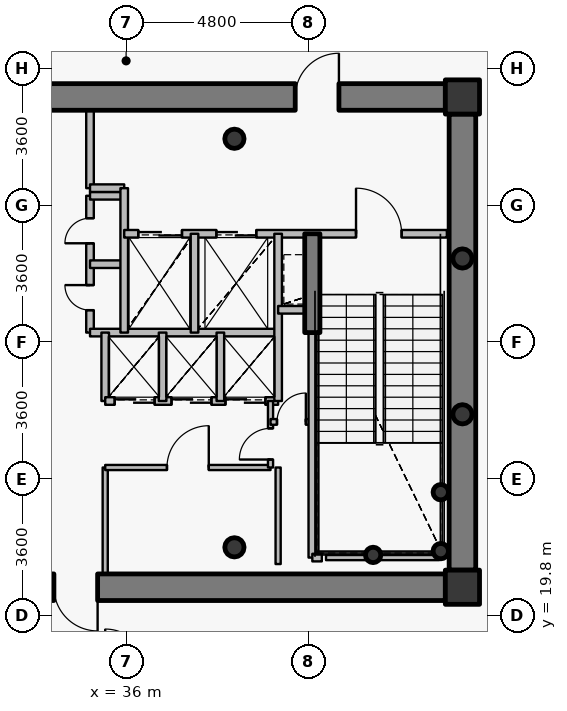
"""IFC4 building model, lengths in metres.
Left out: names, types, materials, properties, quantities, classifications, styles, units other than length and angle.
Written with IfcOpenShell. Run it as: python <this file> out.ifc"""

import sys

from ifc_helpers import new_model, si_unit, direction, frame, frame_2d, origin, origin_2d, place, context, subcontext, project, spatial, rectangle, hollow_circle, extrude, source, transform, mapped, element, fill, save


model = new_model("IFC4")
c1 = context("Model", 3, precision=1e-05, world=origin(), true_north=direction((0.0, 1.0)))
c2 = subcontext(c1, "Body", "Model", "MODEL_VIEW")
j1 = project(units=[si_unit("LENGTHUNIT", "METRE"), si_unit("PLANEANGLEUNIT", "RADIAN")], contexts=[c1])
p1 = place(None, origin())
s1 = spatial("IfcSite", under=j1, at=p1, CompositionType="ELEMENT")
p2 = place(p1, origin())
s2 = spatial("IfcBuilding", under=s1, at=p2, CompositionType="ELEMENT")
p3 = place(p2, frame((0.0, 0.0, 351.0)))
s3 = spatial("IfcBuildingStorey", under=s2, at=p3, CompositionType="ELEMENT", Elevation=351.0)
for number, where, z_axis, x_axis in (
    (1, (44.85, 20.55, 0.0), (0.0, 0.0, 1.0), (1.0, 0.0, 0.0)),
    (2, (44.85, 33.45, 0.0), (0.0, 0.0, 1.0), (1.0, 0.0, 0.0)),
):
    element("IfcColumn", number, at=place(p3, frame(where, z_axis=z_axis, x_axis=x_axis)), inside=s3, PredefinedType="COLUMN", context=c2, shape_type="SweptSolid", body=[
        extrude(rectangle(XDim=0.9, YDim=0.9, at=origin_2d()), origin(), (0.0, 0.0, 1.0), 4.2),
    ])
for number, where, z_axis, x_axis in (
    (3, (38.85, 21.6, 0.0), (0.0, 0.0, 1.0), (1.0, 0.0, 0.0)),
    (4, (38.85, 32.35, 0.0), (0.0, 0.0, 1.0), (1.0, 0.0, 0.0)),
):
    element("IfcColumn", number, at=place(p3, frame(where, z_axis=z_axis, x_axis=x_axis)), inside=s3, PredefinedType="COLUMN", context=c2, shape_type="SweptSolid", body=[
        extrude(hollow_circle(Radius=0.254, WallThickness=0.02, at=origin_2d()), origin(), (0.0, 0.0, 1.0), 4.2),
    ])
for number, where, z_axis, x_axis in (
    (5, (44.28, 21.5, 0.0), (0.0, 0.0, 1.0), (1.0, 0.0, 0.0)),
    (6, (44.28, 23.05, 0.0), (0.0, 0.0, 1.0), (1.0, 0.0, 0.0)),
    (7, (42.5, 21.4, 0.0), (0.0, 0.0, 1.0), (1.0, 0.0, 0.0)),
):
    element("IfcColumn", number, at=place(p3, frame(where, z_axis=z_axis, x_axis=x_axis)), inside=s3, PredefinedType="COLUMN", context=c2, shape_type="SweptSolid", body=[
        extrude(hollow_circle(Radius=0.203, WallThickness=0.016, at=origin_2d()), origin(), (0.0, 0.0, 1.0), 4.2),
    ])
p4 = place(p3, frame((27.6, 33.45, 0.0), z_axis=(0.0, 0.0, 1.0), x_axis=(1.0, 0.0, 0.0)))
e8 = element("IfcWall", 8, at=p4, inside=s3, PredefinedType="SHEAR", context=c2, shape_type="SweptSolid", body=[
    extrude(rectangle(XDim=16.8, YDim=0.7, at=frame_2d((8.4, 0.0))), origin(), (0.0, 0.0, 1.0), 3.5),
])
p5 = place(p4, frame((12.85, 0.0, 0.0)))
e9 = element("IfcOpeningElement", 9, at=p5, cuts=e8, PredefinedType="OPENING", context=c2, shape_type="SweptSolid", body=[
    extrude(rectangle(XDim=1.15, YDim=2.15, at=origin_2d()), frame((0.575, 0.36, 1.075), z_axis=(0.0, -1.0, 0.0), x_axis=(1.0, 0.0, 0.0)), (0.0, 0.0, 1.0), 0.72),
])
p6 = place(p3, frame((44.85, 33.0, 0.0), z_axis=(0.0, 0.0, 1.0), x_axis=(0.0, -1.0, 0.0)))
e10 = element("IfcWall", 10, at=p6, inside=s3, PredefinedType="SHEAR", context=c2, shape_type="SweptSolid", body=[
    extrude(rectangle(XDim=12.0, YDim=0.7, at=frame_2d((6.0, 0.0))), origin(), (0.0, 0.0, 1.0), 3.5),
])
p7 = place(p3, frame((44.4, 20.55, 0.0), z_axis=(0.0, 0.0, 1.0), x_axis=(-1.0, 0.0, 0.0)))
e11 = element("IfcWall", 11, at=p7, inside=s3, PredefinedType="SHEAR", context=c2, shape_type="SweptSolid", body=[
    extrude(rectangle(XDim=16.8, YDim=0.7, at=frame_2d((8.4, 0.0))), origin(), (0.0, 0.0, 1.0), 3.5),
])
p8 = place(p7, frame((13.0, 0.0, 0.0)))
e12 = element("IfcOpeningElement", 12, at=p8, cuts=e11, PredefinedType="OPENING", context=c2, shape_type="SweptSolid", body=[
    extrude(rectangle(XDim=1.15, YDim=2.15, at=origin_2d()), frame((0.575, 0.36, 1.075), z_axis=(0.0, -1.0, 0.0), x_axis=(1.0, 0.0, 0.0)), (0.0, 0.0, 1.0), 0.72),
])
p9 = place(p7, frame((9.15, 0.0, 0.0)))
e13 = element("IfcOpeningElement", 13, at=p9, cuts=e11, PredefinedType="OPENING", context=c2, shape_type="SweptSolid", body=[
    extrude(rectangle(XDim=1.15, YDim=2.15, at=origin_2d()), frame((0.575, 0.36, 1.075), z_axis=(0.0, -1.0, 0.0), x_axis=(1.0, 0.0, 0.0)), (0.0, 0.0, 1.0), 0.72),
])
p10 = place(p3, frame((40.9, 27.25, 0.0), z_axis=(0.0, 0.0, 1.0), x_axis=(0.0, 1.0, 0.0)))
e14 = element("IfcWall", 14, at=p10, inside=s3, PredefinedType="SHEAR", context=c2, shape_type="SweptSolid", body=[
    extrude(rectangle(XDim=2.6, YDim=0.4, at=frame_2d((1.3, 0.0))), origin(), (0.0, 0.0, 1.0), 3.55),
])
for number, where, z_axis, x_axis in (
    (15, (44.85, 25.1, 0.0), (0.0, 0.0, 1.0), (1.0, 0.0, 0.0)),
    (16, (44.85, 29.2, 0.0), (0.0, 0.0, 1.0), (1.0, 0.0, 0.0)),
):
    element("IfcColumn", number, at=place(p3, frame(where, z_axis=z_axis, x_axis=x_axis)), inside=s3, PredefinedType="COLUMN", context=c2, shape_type="SweptSolid", body=[
        extrude(hollow_circle(Radius=0.254, WallThickness=0.02, at=origin_2d()), origin(), (0.0, 0.0, 1.0), 4.2),
    ])
p11 = place(p3, frame((35.05, 27.25, 0.0), z_axis=(0.0, 0.0, 1.0), x_axis=(0.0, 1.0, 0.0)))
e17 = element("IfcWall", 17, at=p11, inside=s3, PredefinedType="PARTITIONING", context=c2, shape_type="SweptSolid", body=[
    extrude(rectangle(XDim=3.6, YDim=0.2, at=frame_2d((1.8, 0.0))), origin(), (0.0, 0.0, 1.0), 3.95),
])
p12 = place(p11, frame((0.59, 0.0, 0.0)))
e18 = element("IfcOpeningElement", 18, at=p12, cuts=e17, PredefinedType="OPENING", context=c2, shape_type="SweptSolid", body=[
    extrude(rectangle(XDim=0.66, YDim=2.05, at=origin_2d()), frame((0.33, 0.11, 1.025), z_axis=(0.0, -1.0, 0.0), x_axis=(1.0, 0.0, 0.0)), (0.0, 0.0, 1.0), 0.22),
])
p13 = place(p11, frame((2.35, 0.0, 0.0)))
e19 = element("IfcOpeningElement", 19, at=p13, cuts=e17, PredefinedType="OPENING", context=c2, shape_type="SweptSolid", body=[
    extrude(rectangle(XDim=0.66, YDim=2.05, at=origin_2d()), frame((0.33, 0.11, 1.025), z_axis=(0.0, -1.0, 0.0), x_axis=(1.0, 0.0, 0.0)), (0.0, 0.0, 1.0), 0.22),
])
p14 = place(p3, frame((35.05, 27.25, 0.0), z_axis=(0.0, 0.0, 1.0), x_axis=(1.0, 0.0, 0.0)))
e20 = element("IfcWall", 20, at=p14, inside=s3, PredefinedType="PARTITIONING", context=c2, shape_type="SweptSolid", body=[
    extrude(rectangle(XDim=4.95, YDim=0.2, at=frame_2d((2.475, 0.0))), origin(), (0.0, 0.0, 1.0), 3.535),
])
for number, where, z_axis, x_axis in (
    (21, (35.05, 29.05, 0.0), (0.0, 0.0, 1.0), (1.0, 0.0, 0.0)),
    (22, (35.05, 30.85, 0.0), (0.0, 0.0, 1.0), (1.0, 0.0, 0.0)),
):
    element("IfcWall", number, at=place(p3, frame(where, z_axis=z_axis, x_axis=x_axis)), inside=s3, PredefinedType="PARTITIONING", context=c2, shape_type="SweptSolid", body=[
        extrude(rectangle(XDim=0.9, YDim=0.2, at=frame_2d((0.45, 0.0))), origin(), (0.0, 0.0, 1.0), 3.95),
    ])
p15 = place(p3, frame((35.05, 31.05, 0.0), z_axis=(0.0, 0.0, 1.0), x_axis=(0.0, 1.0, 0.0)))
e23 = element("IfcWall", 23, at=p15, inside=s3, PredefinedType="PARTITIONING", context=c2, shape_type="SweptSolid", body=[
    extrude(rectangle(XDim=2.05, YDim=0.2, at=frame_2d((1.025, 0.0))), origin(), (0.0, 0.0, 1.0), 3.535),
])
p16 = place(p3, frame((35.05, 31.05, 0.0), z_axis=(0.0, 0.0, 1.0), x_axis=(1.0, 0.0, 0.0)))
e24 = element("IfcWall", 24, at=p16, inside=s3, PredefinedType="PARTITIONING", context=c2, shape_type="SweptSolid", body=[
    extrude(rectangle(XDim=0.9, YDim=0.2, at=frame_2d((0.45, 0.0))), origin(), (0.0, 0.0, 1.0), 3.95),
])
p17 = place(p3, frame((35.45, 20.9, 0.0), z_axis=(0.0, 0.0, 1.0), x_axis=(0.0, 1.0, 0.0)))
e25 = element("IfcWall", 25, at=p17, inside=s3, PredefinedType="PARTITIONING", context=c2, shape_type="SweptSolid", body=[
    extrude(rectangle(XDim=2.8, YDim=0.135, at=frame_2d((1.4, 0.0))), origin(), (0.0, 0.0, 1.0), 3.535),
])
p18 = place(p3, frame((35.45, 23.7, 0.0), z_axis=(0.0, 0.0, 1.0), x_axis=(1.0, 0.0, 0.0)))
e26 = element("IfcWall", 26, at=p18, inside=s3, PredefinedType="PARTITIONING", context=c2, shape_type="SweptSolid", body=[
    extrude(rectangle(XDim=4.35, YDim=0.135, at=frame_2d((2.175, 0.0))), origin(), (0.0, 0.0, 1.0), 3.535),
])
p19 = place(p18, frame((1.625, 0.0, 0.0)))
e27 = element("IfcOpeningElement", 27, at=p19, cuts=e26, PredefinedType="OPENING", context=c2, shape_type="SweptSolid", body=[
    extrude(rectangle(XDim=1.1, YDim=2.15, at=origin_2d()), frame((0.55, 0.078, 1.075), z_axis=(0.0, -1.0, 0.0), x_axis=(1.0, 0.0, 0.0)), (0.0, 0.0, 1.0), 0.155),
])
p20 = place(p3, frame((35.45, 25.45, 0.0), z_axis=(0.0, 0.0, 1.0), x_axis=(0.0, 1.0, 0.0)))
e28 = element("IfcWall", 28, at=p20, inside=s3, PredefinedType="PARTITIONING", context=c2, shape_type="SweptSolid", body=[
    extrude(rectangle(XDim=1.8, YDim=0.2, at=frame_2d((0.9, 0.0))), origin(), (0.0, 0.0, 1.0), 3.95),
])
p21 = place(p3, frame((35.45, 25.45, 0.0), z_axis=(0.0, 0.0, 1.0), x_axis=(1.0, 0.0, 0.0)))
e29 = element("IfcWall", 29, at=p21, inside=s3, PredefinedType="PARTITIONING", context=c2, shape_type="SweptSolid", body=[
    extrude(rectangle(XDim=4.55, YDim=0.2, at=frame_2d((2.275, 0.0))), origin(), (0.0, 0.0, 1.0), 3.535),
])
p22 = place(p21, frame((0.25, 0.0, 0.0)))
e30 = element("IfcOpeningElement", 30, at=p22, cuts=e29, PredefinedType="OPENING", context=c2, shape_type="SweptSolid", body=[
    extrude(rectangle(XDim=1.05, YDim=2.15, at=origin_2d()), frame((0.525, 0.11, 1.075), z_axis=(0.0, -1.0, 0.0), x_axis=(1.0, 0.0, 0.0)), (0.0, 0.0, 1.0), 0.22),
])
p23 = place(p21, frame((1.745, 0.0, 0.0)))
e31 = element("IfcOpeningElement", 31, at=p23, cuts=e29, PredefinedType="OPENING", context=c2, shape_type="SweptSolid", body=[
    extrude(rectangle(XDim=1.05, YDim=2.15, at=origin_2d()), frame((0.525, 0.11, 1.075), z_axis=(0.0, -1.0, 0.0), x_axis=(1.0, 0.0, 0.0)), (0.0, 0.0, 1.0), 0.22),
])
p24 = place(p21, frame((3.165, 0.0, 0.0)))
e32 = element("IfcOpeningElement", 32, at=p24, cuts=e29, PredefinedType="OPENING", context=c2, shape_type="SweptSolid", body=[
    extrude(rectangle(XDim=1.05, YDim=2.15, at=origin_2d()), frame((0.525, 0.11, 1.075), z_axis=(0.0, -1.0, 0.0), x_axis=(1.0, 0.0, 0.0)), (0.0, 0.0, 1.0), 0.22),
])
p25 = place(p3, frame((35.95, 27.25, 0.0), z_axis=(0.0, 0.0, 1.0), x_axis=(0.0, 1.0, 0.0)))
e33 = element("IfcWall", 33, at=p25, inside=s3, PredefinedType="PARTITIONING", context=c2, shape_type="SweptSolid", body=[
    extrude(rectangle(XDim=3.8, YDim=0.2, at=frame_2d((1.9, 0.0))), origin(), (0.0, 0.0, 1.0), 3.95),
])
p26 = place(p3, frame((35.95, 29.85, 0.0), z_axis=(0.0, 0.0, 1.0), x_axis=(1.0, 0.0, 0.0)))
e34 = element("IfcWall", 34, at=p26, inside=s3, PredefinedType="PARTITIONING", context=c2, shape_type="SweptSolid", body=[
    extrude(rectangle(XDim=8.49, YDim=0.2, at=frame_2d((4.245, 0.0))), origin(), (0.0, 0.0, 1.0), 3.535),
])
p27 = place(p26, frame((6.1, 0.0, 0.0)))
e35 = element("IfcOpeningElement", 35, at=p27, cuts=e34, PredefinedType="OPENING", context=c2, shape_type="SweptSolid", body=[
    extrude(rectangle(XDim=1.2, YDim=2.15, at=origin_2d()), frame((0.6, 0.11, 1.075), z_axis=(0.0, -1.0, 0.0), x_axis=(1.0, 0.0, 0.0)), (0.0, 0.0, 1.0), 0.22),
])
p28 = place(p26, frame((0.37, 0.0, 0.0)))
e36 = element("IfcOpeningElement", 36, at=p28, cuts=e34, PredefinedType="OPENING", context=c2, shape_type="SweptSolid", body=[
    extrude(rectangle(XDim=1.15, YDim=2.15, at=origin_2d()), frame((0.575, 0.11, 1.075), z_axis=(0.0, -1.0, 0.0), x_axis=(1.0, 0.0, 0.0)), (0.0, 0.0, 1.0), 0.22),
])
p29 = place(p26, frame((2.425, 0.0, 0.0)))
e37 = element("IfcOpeningElement", 37, at=p29, cuts=e34, PredefinedType="OPENING", context=c2, shape_type="SweptSolid", body=[
    extrude(rectangle(XDim=1.05, YDim=2.15, at=origin_2d()), frame((0.525, 0.11, 1.075), z_axis=(0.0, -1.0, 0.0), x_axis=(1.0, 0.0, 0.0)), (0.0, 0.0, 1.0), 0.22),
])
p30 = place(p3, frame((36.96, 25.45, 0.0), z_axis=(0.0, 0.0, 1.0), x_axis=(0.0, 1.0, 0.0)))
e38 = element("IfcWall", 38, at=p30, inside=s3, PredefinedType="PARTITIONING", context=c2, shape_type="SweptSolid", body=[
    extrude(rectangle(XDim=1.8, YDim=0.2, at=frame_2d((0.9, 0.0))), origin(), (0.0, 0.0, 1.0), 3.95),
])
p31 = place(p3, frame((37.8, 27.25, 0.0), z_axis=(0.0, 0.0, 1.0), x_axis=(0.0, 1.0, 0.0)))
e39 = element("IfcWall", 39, at=p31, inside=s3, PredefinedType="PARTITIONING", context=c2, shape_type="SweptSolid", body=[
    extrude(rectangle(XDim=2.6, YDim=0.2, at=frame_2d((1.3, 0.0))), origin(), (0.0, 0.0, 1.0), 3.95),
])
p32 = place(p3, frame((38.48, 25.45, 0.0), z_axis=(0.0, 0.0, 1.0), x_axis=(0.0, 1.0, 0.0)))
e40 = element("IfcWall", 40, at=p32, inside=s3, PredefinedType="PARTITIONING", context=c2, shape_type="SweptSolid", body=[
    extrude(rectangle(XDim=1.8, YDim=0.2, at=frame_2d((0.9, 0.0))), origin(), (0.0, 0.0, 1.0), 3.95),
])
p33 = place(p3, frame((39.8, 23.7, 0.0), z_axis=(0.0, 0.0, 1.0), x_axis=(0.0, 1.0, 0.0)))
e41 = element("IfcWall", 41, at=p33, inside=s3, PredefinedType="PARTITIONING", context=c2, shape_type="SweptSolid", body=[
    extrude(rectangle(XDim=1.75, YDim=0.135, at=frame_2d((0.875, 0.0))), origin(), (0.0, 0.0, 1.0), 3.95),
])
p34 = place(p33, frame((0.21, 0.0, 0.0)))
e42 = element("IfcOpeningElement", 42, at=p34, cuts=e41, PredefinedType="OPENING", context=c2, shape_type="SweptSolid", body=[
    extrude(rectangle(XDim=0.82, YDim=2.1, at=origin_2d()), frame((0.41, 0.078, 1.05), z_axis=(0.0, -1.0, 0.0), x_axis=(1.0, 0.0, 0.0)), (0.0, 0.0, 1.0), 0.155),
])
p35 = place(p3, frame((39.8, 24.9, 0.0), z_axis=(0.0, 0.0, 1.0), x_axis=(1.0, 0.0, 0.0)))
e43 = element("IfcWall", 43, at=p35, inside=s3, PredefinedType="PARTITIONING", context=c2, shape_type="SweptSolid", body=[
    extrude(rectangle(XDim=1.1, YDim=0.15, at=frame_2d((0.55, 0.0))), origin(), (0.0, 0.0, 1.0), 3.95),
])
p36 = place(p35, frame((0.17, 0.0, 0.0)))
e44 = element("IfcOpeningElement", 44, at=p36, cuts=e43, PredefinedType="OPENING", context=c2, shape_type="SweptSolid", body=[
    extrude(rectangle(XDim=0.76, YDim=2.1, at=origin_2d()), frame((0.38, 0.085, 1.05), z_axis=(0.0, -1.0, 0.0), x_axis=(1.0, 0.0, 0.0)), (0.0, 0.0, 1.0), 0.17),
])
p37 = place(p3, frame((40.0, 25.45, 0.0), z_axis=(0.0, 0.0, 1.0), x_axis=(0.0, 1.0, 0.0)))
e45 = element("IfcWall", 45, at=p37, inside=s3, PredefinedType="PARTITIONING", context=c2, shape_type="SweptSolid", body=[
    extrude(rectangle(XDim=4.4, YDim=0.2, at=frame_2d((2.2, 0.0))), origin(), (0.0, 0.0, 1.0), 3.95),
])
p38 = place(p3, frame((40.0, 27.85, 0.0), z_axis=(0.0, 0.0, 1.0), x_axis=(1.0, 0.0, 0.0)))
e46 = element("IfcWall", 46, at=p38, inside=s3, PredefinedType="PARTITIONING", context=c2, shape_type="SweptSolid", body=[
    extrude(rectangle(XDim=0.9, YDim=0.2, at=frame_2d((0.45, 0.0))), origin(), (0.0, 0.0, 1.0), 3.95),
])
p39 = place(p3, frame((40.9, 21.33, 0.0), z_axis=(0.0, 0.0, 1.0), x_axis=(0.0, 1.0, 0.0)))
e47 = element("IfcWall", 47, at=p39, inside=s3, PredefinedType="PARTITIONING", context=c2, shape_type="SweptSolid", body=[
    extrude(rectangle(XDim=5.91, YDim=0.2, at=frame_2d((2.955, 0.0))), origin(), (0.0, 0.0, 1.0), 3.485),
])
p40 = place(p3, frame((40.9, 21.33, 0.0), z_axis=(0.0, 0.0, 1.0), x_axis=(1.0, 0.0, 0.0)))
e48 = element("IfcWall", 48, at=p40, inside=s3, PredefinedType="PARTITIONING", context=c2, shape_type="SweptSolid", body=[
    extrude(rectangle(XDim=0.25, YDim=0.2, at=frame_2d((0.125, 0.0))), origin(), (0.0, 0.0, 1.0), 3.485),
])
p41 = place(p3, frame((44.24, 21.33, 0.0), z_axis=(0.0, 0.0, 1.0), x_axis=(-1.0, 0.0, 0.0)))
e49 = element("IfcWall", 49, at=p41, inside=s3, PredefinedType="PARTITIONING", context=c2, shape_type="SweptSolid", body=[
    extrude(rectangle(XDim=2.98, YDim=0.135, at=frame_2d((1.49, 0.0))), origin(), (0.0, 0.0, 1.0), 3.485),
])
p42 = place(p3, frame((40.0, 23.7, 0.0), z_axis=(0.0, 0.0, 1.0), x_axis=(0.0, -1.0, 0.0)))
e50 = element("IfcWall", 50, at=p42, inside=s3, PredefinedType="PARTITIONING", context=c2, shape_type="SweptSolid", body=[
    extrude(rectangle(XDim=2.54, YDim=0.135, at=frame_2d((1.27, 0.0))), origin(), (0.0, 0.0, 1.0), 3.485),
])
for number, where, z_axis, x_axis in (
    (51, (45.2, 33.8, 0.0), (0.0, 0.0, 1.0), (-1.0, 0.0, 0.0)),
    (52, (44.41, 20.2, 0.0), (0.0, 0.0, 1.0), (1.0, 0.0, 0.0)),
):
    element("IfcWall", number, at=place(p3, frame(where, z_axis=z_axis, x_axis=x_axis)), inside=s3, PredefinedType="PARTITIONING", context=c2, shape_type="SweptSolid", body=[
        extrude(rectangle(XDim=0.79, YDim=0.135, at=frame_2d((0.395, 0.0))), origin(), (0.0, 0.0, 1.0), 2.735),
    ])
for number, where, z_axis, x_axis in (
    (53, (45.2, 20.508, 0.0), (0.0, 0.0, 1.0), (0.0, 1.0, 0.0)),
    (54, (45.2, 33.01, 0.0), (0.0, 0.0, 1.0), (0.0, 1.0, 0.0)),
):
    element("IfcWall", number, at=place(p3, frame(where, z_axis=z_axis, x_axis=x_axis)), inside=s3, PredefinedType="PARTITIONING", context=c2, shape_type="SweptSolid", body=[
        extrude(rectangle(XDim=0.482, YDim=0.135, at=frame_2d((0.241, 0.0))), origin(), (0.0, 0.0, 1.0), 3.95),
    ])
m1 = source(origin(), c2, "Body", "SweptSolid", [
    extrude(rectangle(XDim=1.15, YDim=2.15, at=origin_2d()), frame((0.575, 0.025, 1.075), z_axis=(0.0, -1.0, 0.0), x_axis=(1.0, 0.0, 0.0)), (0.0, 0.0, 1.0), 0.05),
])
p43 = place(p5, origin())
e55 = element("IfcDoor", 55, at=p43, inside=s3, OperationType="SINGLE_SWING_RIGHT", PredefinedType="DOOR", context=c2, shape_type="MappedRepresentation", body=[
    mapped(m1, transform((0.0, 0.0, 0.0), x_axis=(1.0, 0.0, 0.0), y_axis=(0.0, 1.0, 0.0), z_axis=(0.0, 0.0, 1.0), scale=1.0)),
])
fill(e9, e55)
p44 = place(p9, origin())
e56 = element("IfcDoor", 56, at=p44, inside=s3, OperationType="SINGLE_SWING_LEFT", PredefinedType="DOOR", context=c2, shape_type="MappedRepresentation", body=[
    mapped(m1, transform((0.0, 0.0, 0.0), x_axis=(1.0, 0.0, 0.0), y_axis=(0.0, 1.0, 0.0), z_axis=(0.0, 0.0, 1.0), scale=1.0)),
])
fill(e13, e56)
m2 = source(origin(), c2, "Body", "SweptSolid", [
    extrude(rectangle(XDim=1.2, YDim=2.15, at=origin_2d()), frame((0.6, 0.025, 1.075), z_axis=(0.0, -1.0, 0.0), x_axis=(1.0, 0.0, 0.0)), (0.0, 0.0, 1.0), 0.05),
])
p45 = place(p27, origin())
e57 = element("IfcDoor", 57, at=p45, inside=s3, OperationType="SINGLE_SWING_LEFT", PredefinedType="DOOR", context=c2, shape_type="MappedRepresentation", body=[
    mapped(m2, transform((0.0, 0.0, 0.0), x_axis=(1.0, 0.0, 0.0), y_axis=(0.0, 1.0, 0.0), z_axis=(0.0, 0.0, 1.0), scale=1.0)),
])
fill(e35, e57)
m3 = source(origin(), c2, "Body", "SweptSolid", [
    extrude(rectangle(XDim=1.15, YDim=2.15, at=origin_2d()), frame((0.575, 0.025, 1.075), z_axis=(0.0, -1.0, 0.0), x_axis=(1.0, 0.0, 0.0)), (0.0, 0.0, 1.0), 0.05),
])
p46 = place(p28, origin())
e58 = element("IfcDoor", 58, at=p46, inside=s3, OperationType="DOUBLE_DOOR_SLIDING", PredefinedType="USERDEFINED", context=c2, shape_type="MappedRepresentation", body=[
    mapped(m3, transform((0.0, 0.0, 0.0), x_axis=(1.0, 0.0, 0.0), y_axis=(0.0, 1.0, 0.0), z_axis=(0.0, 0.0, 1.0), scale=1.0)),
])
fill(e36, e58)
m4 = source(origin(), c2, "Body", "SweptSolid", [
    extrude(rectangle(XDim=1.05, YDim=2.15, at=origin_2d()), frame((0.525, 0.025, 1.075), z_axis=(0.0, -1.0, 0.0), x_axis=(1.0, 0.0, 0.0)), (0.0, 0.0, 1.0), 0.05),
])
p47 = place(p29, origin())
e59 = element("IfcDoor", 59, at=p47, inside=s3, OperationType="DOUBLE_DOOR_SLIDING", PredefinedType="USERDEFINED", context=c2, shape_type="MappedRepresentation", body=[
    mapped(m4, transform((0.0, 0.0, 0.0), x_axis=(1.0, 0.0, 0.0), y_axis=(0.0, 1.0, 0.0), z_axis=(0.0, 0.0, 1.0), scale=1.0)),
])
fill(e37, e59)
p48 = place(p22, origin())
e60 = element("IfcDoor", 60, at=p48, inside=s3, OperationType="DOUBLE_DOOR_SLIDING", PredefinedType="USERDEFINED", context=c2, shape_type="MappedRepresentation", body=[
    mapped(m4, transform((0.0, 0.0, 0.0), x_axis=(1.0, 0.0, 0.0), y_axis=(0.0, 1.0, 0.0), z_axis=(0.0, 0.0, 1.0), scale=1.0)),
])
fill(e30, e60)
p49 = place(p23, origin())
e61 = element("IfcDoor", 61, at=p49, inside=s3, OperationType="DOUBLE_DOOR_SLIDING", PredefinedType="USERDEFINED", context=c2, shape_type="MappedRepresentation", body=[
    mapped(m4, transform((0.0, 0.0, 0.0), x_axis=(1.0, 0.0, 0.0), y_axis=(0.0, 1.0, 0.0), z_axis=(0.0, 0.0, 1.0), scale=1.0)),
])
fill(e31, e61)
p50 = place(p24, origin())
e62 = element("IfcDoor", 62, at=p50, inside=s3, OperationType="DOUBLE_DOOR_SLIDING", PredefinedType="USERDEFINED", context=c2, shape_type="MappedRepresentation", body=[
    mapped(m4, transform((0.0, 0.0, 0.0), x_axis=(1.0, 0.0, 0.0), y_axis=(0.0, 1.0, 0.0), z_axis=(0.0, 0.0, 1.0), scale=1.0)),
])
fill(e32, e62)
m5 = source(origin(), c2, "Body", "SweptSolid", [
    extrude(rectangle(XDim=0.66, YDim=2.05, at=origin_2d()), frame((0.33, 0.025, 1.025), z_axis=(0.0, -1.0, 0.0), x_axis=(1.0, 0.0, 0.0)), (0.0, 0.0, 1.0), 0.05),
])
p51 = place(p12, origin())
e63 = element("IfcDoor", 63, at=p51, inside=s3, OperationType="SINGLE_SWING_RIGHT", PredefinedType="USERDEFINED", context=c2, shape_type="MappedRepresentation", body=[
    mapped(m5, transform((0.0, 0.0, 0.0), x_axis=(1.0, 0.0, 0.0), y_axis=(0.0, 1.0, 0.0), z_axis=(0.0, 0.0, 1.0), scale=1.0)),
])
fill(e18, e63)
p52 = place(p13, origin())
e64 = element("IfcDoor", 64, at=p52, inside=s3, OperationType="SINGLE_SWING_LEFT", PredefinedType="USERDEFINED", context=c2, shape_type="MappedRepresentation", body=[
    mapped(m5, transform((0.0, 0.0, 0.0), x_axis=(1.0, 0.0, 0.0), y_axis=(0.0, 1.0, 0.0), z_axis=(0.0, 0.0, 1.0), scale=1.0)),
])
fill(e19, e64)
m6 = source(origin(), c2, "Body", "SweptSolid", [
    extrude(rectangle(XDim=1.1, YDim=2.15, at=origin_2d()), frame((0.55, 0.025, 1.075), z_axis=(0.0, -1.0, 0.0), x_axis=(1.0, 0.0, 0.0)), (0.0, 0.0, 1.0), 0.05),
])
p53 = place(p19, origin())
e65 = element("IfcDoor", 65, at=p53, inside=s3, OperationType="SINGLE_SWING_RIGHT", PredefinedType="DOOR", context=c2, shape_type="MappedRepresentation", body=[
    mapped(m6, transform((0.0, 0.0, 0.0), x_axis=(1.0, 0.0, 0.0), y_axis=(0.0, 1.0, 0.0), z_axis=(0.0, 0.0, 1.0), scale=1.0)),
])
fill(e27, e65)
m7 = source(origin(), c2, "Body", "SweptSolid", [
    extrude(rectangle(XDim=0.82, YDim=2.1, at=origin_2d()), frame((0.41, 0.025, 1.05), z_axis=(0.0, -1.0, 0.0), x_axis=(1.0, 0.0, 0.0)), (0.0, 0.0, 1.0), 0.05),
])
p54 = place(p34, origin())
e66 = element("IfcDoor", 66, at=p54, inside=s3, OperationType="SINGLE_SWING_LEFT", PredefinedType="DOOR", context=c2, shape_type="MappedRepresentation", body=[
    mapped(m7, transform((0.0, 0.0, 0.0), x_axis=(1.0, 0.0, 0.0), y_axis=(0.0, 1.0, 0.0), z_axis=(0.0, 0.0, 1.0), scale=1.0)),
])
fill(e42, e66)
m8 = source(origin(), c2, "Body", "SweptSolid", [
    extrude(rectangle(XDim=0.76, YDim=2.1, at=origin_2d()), frame((0.38, 0.025, 1.05), z_axis=(0.0, -1.0, 0.0), x_axis=(1.0, 0.0, 0.0)), (0.0, 0.0, 1.0), 0.05),
])
p55 = place(p36, origin())
e67 = element("IfcDoor", 67, at=p55, inside=s3, OperationType="SINGLE_SWING_RIGHT", PredefinedType="DOOR", context=c2, shape_type="MappedRepresentation", body=[
    mapped(m8, transform((0.0, 0.0, 0.0), x_axis=(1.0, 0.0, 0.0), y_axis=(0.0, 1.0, 0.0), z_axis=(0.0, 0.0, 1.0), scale=1.0)),
])
fill(e44, e67)
save(model, sys.argv[1])
